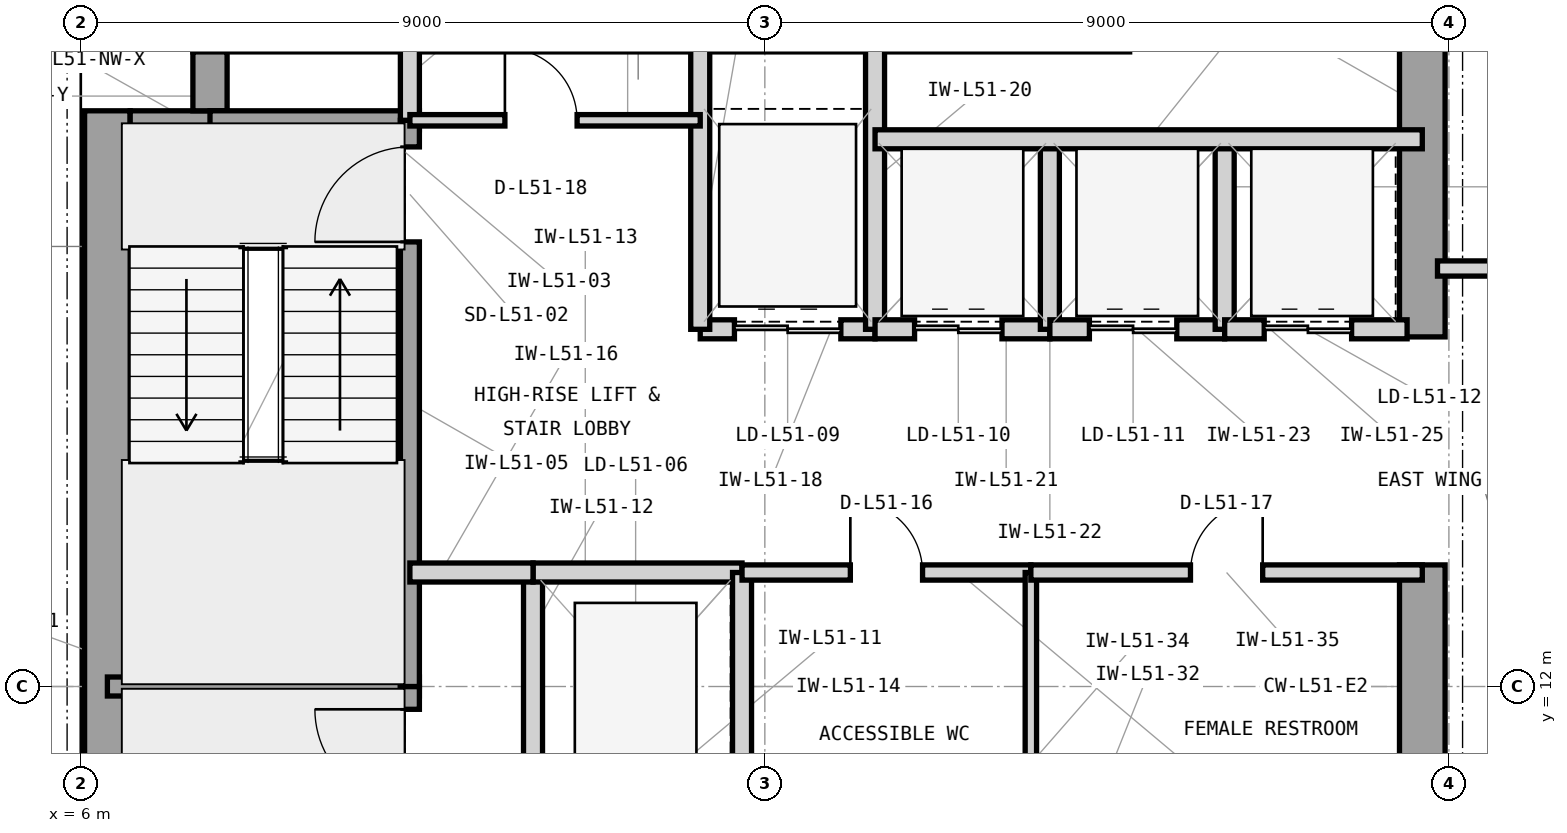
"""IFC4 building model, lengths in metres.
Left out: names, types, materials, properties, quantities, classifications, styles, units other than length and angle.
Written with IfcOpenShell. Run it as: python <this file> out.ifc"""

import sys

from ifc_helpers import new_model, si_unit, direction, frame, frame_2d, origin, place, context, subcontext, project, spatial, rectangle, extrude, element, fill, save


model = new_model("IFC4")
c1 = context("Model", 3, precision=1e-05, world=origin(), true_north=direction((0.0, 1.0)))
c2 = subcontext(c1, "Body", "Model", "MODEL_VIEW")
j1 = project(units=[si_unit("LENGTHUNIT", "METRE"), si_unit("PLANEANGLEUNIT", "RADIAN")], contexts=[c1])
p1 = place(None, origin())
s1 = spatial("IfcSite", under=j1, at=p1, CompositionType="ELEMENT")
p2 = place(p1, origin())
s2 = spatial("IfcBuilding", under=s1, at=p2, CompositionType="ELEMENT")
p3 = place(p2, frame((0.0, 0.0, 211.2)))
s3 = spatial("IfcBuildingStorey", under=s2, at=p3, CompositionType="ELEMENT", Elevation=211.2)
p4 = place(p3, frame((6.35, 4.425, 0.0), z_axis=(0.0, 0.0, 1.0), x_axis=(0.0, 1.0, 0.0)))
e1 = element("IfcWall", 1, at=p4, inside=s3, PredefinedType="SHEAR", context=c2, shape_type="SweptSolid", body=[
    extrude(rectangle(XDim=15.15, YDim=0.6, at=frame_2d((7.575, 0.0))), origin(), (0.0, 0.0, 1.0), 3.9),
])
p5 = place(p3, frame((7.475, 20.65, 0.0), z_axis=(0.0, 0.0, 1.0), x_axis=(1.0, 0.0, 0.0)))
e2 = element("IfcWall", 2, at=p5, inside=s3, PredefinedType="SHEAR", context=c2, shape_type="SweptSolid", body=[
    extrude(rectangle(XDim=12.325, YDim=0.6, at=frame_2d((6.163, 0.0))), origin(), (0.0, 0.0, 1.0), 3.9),
])
p6 = place(p3, frame((23.65, 10.4, 0.0), z_axis=(0.0, 0.0, 1.0), x_axis=(0.0, 1.0, 0.0)))
e3 = element("IfcWall", 3, at=p6, inside=s3, PredefinedType="SHEAR", context=c2, shape_type="SweptSolid", body=[
    extrude(rectangle(XDim=3.2, YDim=0.6, at=frame_2d((1.6, 0.0))), origin(), (0.0, 0.0, 1.0), 3.9),
])
p7 = place(p3, frame((23.65, 16.6, 0.0), z_axis=(0.0, 0.0, 1.0), x_axis=(0.0, 1.0, 0.0)))
e4 = element("IfcWall", 4, at=p7, inside=s3, PredefinedType="SHEAR", context=c2, shape_type="SweptSolid", body=[
    extrude(rectangle(XDim=4.05, YDim=0.6, at=frame_2d((2.025, 0.0))), origin(), (0.0, 0.0, 1.0), 3.9),
])
p8 = place(p3, frame((6.65, 19.35, 0.0), z_axis=(0.0, 0.0, 1.0), x_axis=(1.0, 0.0, 0.0)))
e5 = element("IfcWall", 5, at=p8, inside=s3, PredefinedType="SHEAR", context=c2, shape_type="SweptSolid", body=[
    extrude(rectangle(XDim=1.275, YDim=0.45, at=frame_2d((0.638, 0.0))), origin(), (0.0, 0.0, 1.0), 3.9),
])
p9 = place(p3, frame((7.7, 19.575, 0.0), z_axis=(0.0, 0.0, 1.0), x_axis=(0.0, 1.0, 0.0)))
e6 = element("IfcWall", 6, at=p9, inside=s3, PredefinedType="SHEAR", context=c2, shape_type="SweptSolid", body=[
    extrude(rectangle(XDim=0.775, YDim=0.45, at=frame_2d((0.388, 0.0))), origin(), (0.0, 0.0, 1.0), 3.9),
])
p10 = place(p3, frame((6.35, 12.0, 0.0), z_axis=(0.0, 0.0, 1.0), x_axis=(1.0, 0.0, 0.0)))
e7 = element("IfcWall", 7, at=p10, inside=s3, PredefinedType="SHEAR", context=c2, shape_type="SweptSolid", body=[
    extrude(rectangle(XDim=4.105, YDim=0.25, at=frame_2d((2.052, 0.0))), origin(), (0.0, 0.0, 1.0), 3.9),
])
p11 = place(p3, frame((7.7, 19.45, 0.0), z_axis=(0.0, 0.0, 1.0), x_axis=(1.0, 0.0, 0.0)))
e8 = element("IfcWall", 8, at=p11, inside=s3, PredefinedType="SHEAR", context=c2, shape_type="SweptSolid", body=[
    extrude(rectangle(XDim=2.755, YDim=0.25, at=frame_2d((1.377, 0.0))), origin(), (0.0, 0.0, 1.0), 3.9),
])
p12 = place(p3, frame((10.33, 4.55, 0.0), z_axis=(0.0, 0.0, 1.0), x_axis=(0.0, 1.0, 0.0)))
e9 = element("IfcWall", 9, at=p12, inside=s3, PredefinedType="SHEAR", context=c2, shape_type="SweptSolid", body=[
    extrude(rectangle(XDim=7.45, YDim=0.25, at=frame_2d((3.725, 0.0))), origin(), (0.0, 0.0, 1.0), 3.9),
])
p13 = place(p12, frame((5.9, 0.0, 0.0)))
e10 = element("IfcOpeningElement", 10, at=p13, cuts=e9, PredefinedType="OPENING", context=c2, shape_type="SweptSolid", body=[
    extrude(rectangle(XDim=1.25, YDim=2.2, at=frame_2d((0.625, 1.1))), frame((0.0, 0.135, 0.0), z_axis=(0.0, -1.0, 0.0), x_axis=(1.0, 0.0, 0.0)), (0.0, 0.0, 1.0), 0.27),
])
p14 = place(p3, frame((10.33, 12.0, 0.0), z_axis=(0.0, 0.0, 1.0), x_axis=(0.0, 1.0, 0.0)))
e11 = element("IfcWall", 11, at=p14, inside=s3, PredefinedType="SHEAR", context=c2, shape_type="SweptSolid", body=[
    extrude(rectangle(XDim=7.45, YDim=0.25, at=frame_2d((3.725, 0.0))), origin(), (0.0, 0.0, 1.0), 3.9),
])
p15 = place(p14, frame((5.85, 0.0, 0.0)))
e12 = element("IfcOpeningElement", 12, at=p15, cuts=e11, PredefinedType="OPENING", context=c2, shape_type="SweptSolid", body=[
    extrude(rectangle(XDim=1.25, YDim=2.2, at=frame_2d((0.625, 1.1))), frame((0.0, 0.135, 0.0), z_axis=(0.0, -1.0, 0.0), x_axis=(1.0, 0.0, 0.0)), (0.0, 0.0, 1.0), 0.27),
])
p16 = place(p3, frame((10.33, 19.45, 0.0), z_axis=(0.0, 0.0, 1.0), x_axis=(0.0, 1.0, 0.0)))
e13 = element("IfcWall", 13, at=p16, inside=s3, PredefinedType="PARTITIONING", context=c2, shape_type="SweptSolid", body=[
    extrude(rectangle(XDim=1.2, YDim=0.25, at=frame_2d((0.6, 0.0))), origin(), (0.0, 0.0, 1.0), 3.69),
])
p17 = place(p3, frame((11.95, 10.5, 0.0), z_axis=(0.0, 0.0, 1.0), x_axis=(0.0, 1.0, 0.0)))
e14 = element("IfcWall", 14, at=p17, inside=s3, PredefinedType="PARTITIONING", context=c2, shape_type="SweptSolid", body=[
    extrude(rectangle(XDim=3.0, YDim=0.25, at=frame_2d((1.5, 0.0))), origin(), (0.0, 0.0, 1.0), 3.69),
])
p18 = place(p3, frame((11.95, 13.5, 0.0), z_axis=(0.0, 0.0, 1.0), x_axis=(1.0, 0.0, 0.0)))
e15 = element("IfcWall", 15, at=p18, inside=s3, PredefinedType="PARTITIONING", context=c2, shape_type="SweptSolid", body=[
    extrude(rectangle(XDim=2.75, YDim=0.25, at=frame_2d((1.375, 0.0))), origin(), (0.0, 0.0, 1.0), 3.283),
])
p19 = place(p3, frame((14.7, 10.5, 0.0), z_axis=(0.0, 0.0, 1.0), x_axis=(0.0, 1.0, 0.0)))
e16 = element("IfcWall", 16, at=p19, inside=s3, PredefinedType="PARTITIONING", context=c2, shape_type="SweptSolid", body=[
    extrude(rectangle(XDim=3.0, YDim=0.25, at=frame_2d((1.5, 0.0))), origin(), (0.0, 0.0, 1.0), 3.69),
])
p20 = place(p3, frame((10.33, 13.5, 0.0), z_axis=(0.0, 0.0, 1.0), x_axis=(1.0, 0.0, 0.0)))
e17 = element("IfcWall", 17, at=p20, inside=s3, PredefinedType="PARTITIONING", context=c2, shape_type="SweptSolid", body=[
    extrude(rectangle(XDim=1.62, YDim=0.25, at=frame_2d((0.81, 0.0))), origin(), (0.0, 0.0, 1.0), 3.283),
])
p21 = place(p3, frame((14.15, 16.7, 0.0), z_axis=(0.0, 0.0, 1.0), x_axis=(1.0, 0.0, 0.0)))
e18 = element("IfcWall", 18, at=p21, inside=s3, PredefinedType="PARTITIONING", context=c2, shape_type="SweptSolid", body=[
    extrude(rectangle(XDim=2.3, YDim=0.25, at=frame_2d((1.15, 0.0))), origin(), (0.0, 0.0, 1.0), 3.283),
])
p22 = place(p21, frame((0.45, 0.0, 0.0)))
e19 = element("IfcOpeningElement", 19, at=p22, cuts=e18, PredefinedType="OPENING", context=c2, shape_type="SweptSolid", body=[
    extrude(rectangle(XDim=1.4, YDim=2.35, at=frame_2d((0.7, 1.175))), frame((0.0, 0.135, 0.0), z_axis=(0.0, -1.0, 0.0), x_axis=(1.0, 0.0, 0.0)), (0.0, 0.0, 1.0), 0.27),
])
for number, where, z_axis, x_axis in (
    (20, (14.15, 16.7, 0.0), (0.0, 0.0, 1.0), (0.0, 1.0, 0.0)),
    (21, (16.45, 16.7, 0.0), (0.0, 0.0, 1.0), (0.0, 1.0, 0.0)),
):
    element("IfcWall", number, at=place(p3, frame(where, z_axis=z_axis, x_axis=x_axis)), inside=s3, PredefinedType="PARTITIONING", context=c2, shape_type="SweptSolid", body=[
        extrude(rectangle(XDim=3.95, YDim=0.25, at=frame_2d((1.975, 0.0))), origin(), (0.0, 0.0, 1.0), 3.69),
    ])
p23 = place(p3, frame((16.45, 16.7, 0.0), z_axis=(0.0, 0.0, 1.0), x_axis=(1.0, 0.0, 0.0)))
e22 = element("IfcWall", 22, at=p23, inside=s3, PredefinedType="PARTITIONING", context=c2, shape_type="SweptSolid", body=[
    extrude(rectangle(XDim=2.3, YDim=0.25, at=frame_2d((1.15, 0.0))), origin(), (0.0, 0.0, 1.0), 3.283),
])
p24 = place(p23, frame((0.52, 0.0, 0.0)))
e23 = element("IfcOpeningElement", 23, at=p24, cuts=e22, PredefinedType="OPENING", context=c2, shape_type="SweptSolid", body=[
    extrude(rectangle(XDim=1.15, YDim=2.25, at=frame_2d((0.575, 1.125))), frame((0.0, 0.135, 0.0), z_axis=(0.0, -1.0, 0.0), x_axis=(1.0, 0.0, 0.0)), (0.0, 0.0, 1.0), 0.27),
])
p25 = place(p3, frame((18.75, 16.7, 0.0), z_axis=(0.0, 0.0, 1.0), x_axis=(0.0, 1.0, 0.0)))
e24 = element("IfcWall", 24, at=p25, inside=s3, PredefinedType="PARTITIONING", context=c2, shape_type="SweptSolid", body=[
    extrude(rectangle(XDim=2.5, YDim=0.25, at=frame_2d((1.25, 0.0))), origin(), (0.0, 0.0, 1.0), 3.69),
])
p26 = place(p3, frame((18.75, 16.7, 0.0), z_axis=(0.0, 0.0, 1.0), x_axis=(1.0, 0.0, 0.0)))
e25 = element("IfcWall", 25, at=p26, inside=s3, PredefinedType="PARTITIONING", context=c2, shape_type="SweptSolid", body=[
    extrude(rectangle(XDim=2.3, YDim=0.25, at=frame_2d((1.15, 0.0))), origin(), (0.0, 0.0, 1.0), 3.283),
])
p27 = place(p26, frame((0.52, 0.0, 0.0)))
e26 = element("IfcOpeningElement", 26, at=p27, cuts=e25, PredefinedType="OPENING", context=c2, shape_type="SweptSolid", body=[
    extrude(rectangle(XDim=1.15, YDim=2.25, at=frame_2d((0.575, 1.125))), frame((0.0, 0.135, 0.0), z_axis=(0.0, -1.0, 0.0), x_axis=(1.0, 0.0, 0.0)), (0.0, 0.0, 1.0), 0.27),
])
p28 = place(p3, frame((21.05, 16.7, 0.0), z_axis=(0.0, 0.0, 1.0), x_axis=(0.0, 1.0, 0.0)))
e27 = element("IfcWall", 27, at=p28, inside=s3, PredefinedType="PARTITIONING", context=c2, shape_type="SweptSolid", body=[
    extrude(rectangle(XDim=2.5, YDim=0.25, at=frame_2d((1.25, 0.0))), origin(), (0.0, 0.0, 1.0), 3.69),
])
p29 = place(p3, frame((21.05, 16.7, 0.0), z_axis=(0.0, 0.0, 1.0), x_axis=(1.0, 0.0, 0.0)))
e28 = element("IfcWall", 28, at=p29, inside=s3, PredefinedType="PARTITIONING", context=c2, shape_type="SweptSolid", body=[
    extrude(rectangle(XDim=2.4, YDim=0.25, at=frame_2d((1.2, 0.0))), origin(), (0.0, 0.0, 1.0), 3.283),
])
p30 = place(p29, frame((0.52, 0.0, 0.0)))
e29 = element("IfcOpeningElement", 29, at=p30, cuts=e28, PredefinedType="OPENING", context=c2, shape_type="SweptSolid", body=[
    extrude(rectangle(XDim=1.15, YDim=2.25, at=frame_2d((0.575, 1.125))), frame((0.0, 0.135, 0.0), z_axis=(0.0, -1.0, 0.0), x_axis=(1.0, 0.0, 0.0)), (0.0, 0.0, 1.0), 0.27),
])
p31 = place(p3, frame((16.45, 19.2, 0.0), z_axis=(0.0, 0.0, 1.0), x_axis=(1.0, 0.0, 0.0)))
e30 = element("IfcWall", 30, at=p31, inside=s3, PredefinedType="PARTITIONING", context=c2, shape_type="SweptSolid", body=[
    extrude(rectangle(XDim=7.2, YDim=0.25, at=frame_2d((3.6, 0.0))), origin(), (0.0, 0.0, 1.0), 3.69),
])
p32 = place(p3, frame((14.7, 13.5, 0.0), z_axis=(0.0, 0.0, 1.0), x_axis=(1.0, 0.0, 0.0)))
e31 = element("IfcWall", 31, at=p32, inside=s3, PredefinedType="PARTITIONING", context=c2, shape_type="SweptSolid", body=[
    extrude(rectangle(XDim=3.8, YDim=0.2, at=frame_2d((1.9, 0.0))), origin(), (0.0, 0.0, 1.0), 3.283),
])
p33 = place(p32, frame((1.425, 0.0, 0.0)))
e32 = element("IfcOpeningElement", 32, at=p33, cuts=e31, PredefinedType="OPENING", context=c2, shape_type="SweptSolid", body=[
    extrude(rectangle(XDim=0.95, YDim=2.1, at=frame_2d((0.475, 1.05))), frame((0.0, 0.11, 0.0), z_axis=(0.0, -1.0, 0.0), x_axis=(1.0, 0.0, 0.0)), (0.0, 0.0, 1.0), 0.22),
])
p34 = place(p3, frame((18.5, 10.15, 0.0), z_axis=(0.0, 0.0, 1.0), x_axis=(0.0, 1.0, 0.0)))
e33 = element("IfcWall", 33, at=p34, inside=s3, PredefinedType="PARTITIONING", context=c2, shape_type="SweptSolid", body=[
    extrude(rectangle(XDim=3.35, YDim=0.15, at=frame_2d((1.675, 0.0))), origin(), (0.0, 0.0, 1.0), 3.69),
])
p35 = place(p3, frame((18.5, 13.5, 0.0), z_axis=(0.0, 0.0, 1.0), x_axis=(1.0, 0.0, 0.0)))
e34 = element("IfcWall", 34, at=p35, inside=s3, PredefinedType="PARTITIONING", context=c2, shape_type="SweptSolid", body=[
    extrude(rectangle(XDim=5.15, YDim=0.2, at=frame_2d((2.575, 0.0))), origin(), (0.0, 0.0, 1.0), 3.283),
])
p36 = place(p35, frame((2.1, 0.0, 0.0)))
e35 = element("IfcOpeningElement", 35, at=p36, cuts=e34, PredefinedType="OPENING", context=c2, shape_type="SweptSolid", body=[
    extrude(rectangle(XDim=0.95, YDim=2.1, at=frame_2d((0.475, 1.05))), frame((0.0, 0.11, 0.0), z_axis=(0.0, -1.0, 0.0), x_axis=(1.0, 0.0, 0.0)), (0.0, 0.0, 1.0), 0.22),
])
p37 = place(p3, frame((10.33, 19.45, 0.0), z_axis=(0.0, 0.0, 1.0), x_axis=(1.0, 0.0, 0.0)))
e36 = element("IfcWall", 36, at=p37, inside=s3, PredefinedType="PARTITIONING", context=c2, shape_type="SweptSolid", body=[
    extrude(rectangle(XDim=3.82, YDim=0.15, at=frame_2d((1.91, 0.0))), origin(), (0.0, 0.0, 1.0), 3.69),
])
p38 = place(p37, frame((1.25, 0.0, 0.0)))
e37 = element("IfcOpeningElement", 37, at=p38, cuts=e36, PredefinedType="OPENING", context=c2, shape_type="SweptSolid", body=[
    extrude(rectangle(XDim=0.95, YDim=2.1, at=frame_2d((0.475, 1.05))), frame((0.0, 0.085, 0.0), z_axis=(0.0, -1.0, 0.0), x_axis=(1.0, 0.0, 0.0)), (0.0, 0.0, 1.0), 0.17),
])
p39 = place(p3, frame((23.85, 17.5, 0.0), z_axis=(0.0, 0.0, 1.0), x_axis=(1.0, 0.0, 0.0)))
e38 = element("IfcWall", 38, at=p39, inside=s3, PredefinedType="PARTITIONING", context=c2, shape_type="SweptSolid", body=[
    extrude(rectangle(XDim=2.85, YDim=0.2, at=frame_2d((1.425, 0.0))), origin(), (0.0, 0.0, 1.0), 3.69),
])
p40 = place(p39, frame((0.7, 0.0, 0.0)))
e39 = element("IfcOpeningElement", 39, at=p40, cuts=e38, PredefinedType="OPENING", context=c2, shape_type="SweptSolid", body=[
    extrude(rectangle(XDim=1.0, YDim=2.15, at=frame_2d((0.5, 1.075))), frame((0.0, 0.11, 0.0), z_axis=(0.0, -1.0, 0.0), x_axis=(1.0, 0.0, 0.0)), (0.0, 0.0, 1.0), 0.22),
])
p41 = place(p13, origin())
e40 = element("IfcDoor", 40, at=p41, inside=s3, OperationType="SINGLE_SWING_RIGHT", PredefinedType="DOOR", context=c2, shape_type="SweptSolid", body=[
    extrude(rectangle(XDim=1.25, YDim=2.2, at=frame_2d((0.625, 1.1))), frame((0.0, 0.025, 0.0), z_axis=(0.0, -1.0, 0.0), x_axis=(1.0, 0.0, 0.0)), (0.0, 0.0, 1.0), 0.05),
])
fill(e10, e40)
p42 = place(p15, origin())
e41 = element("IfcDoor", 41, at=p42, inside=s3, OperationType="SINGLE_SWING_LEFT", PredefinedType="DOOR", context=c2, shape_type="SweptSolid", body=[
    extrude(rectangle(XDim=1.25, YDim=2.2, at=frame_2d((0.625, 1.1))), frame((0.0, 0.025, 0.0), z_axis=(0.0, -1.0, 0.0), x_axis=(1.0, 0.0, 0.0)), (0.0, 0.0, 1.0), 0.05),
])
fill(e12, e41)
p43 = place(p22, origin())
e42 = element("IfcDoor", 42, at=p43, inside=s3, OperationType="DOUBLE_DOOR_SLIDING", PredefinedType="DOOR", context=c2, shape_type="SweptSolid", body=[
    extrude(rectangle(XDim=1.4, YDim=2.35, at=frame_2d((0.7, 1.175))), frame((0.0, 0.025, 0.0), z_axis=(0.0, -1.0, 0.0), x_axis=(1.0, 0.0, 0.0)), (0.0, 0.0, 1.0), 0.05),
])
fill(e19, e42)
p44 = place(p24, origin())
e43 = element("IfcDoor", 43, at=p44, inside=s3, OperationType="DOUBLE_DOOR_SLIDING", PredefinedType="DOOR", context=c2, shape_type="SweptSolid", body=[
    extrude(rectangle(XDim=1.15, YDim=2.25, at=frame_2d((0.575, 1.125))), frame((0.0, 0.025, 0.0), z_axis=(0.0, -1.0, 0.0), x_axis=(1.0, 0.0, 0.0)), (0.0, 0.0, 1.0), 0.05),
])
fill(e23, e43)
p45 = place(p27, origin())
e44 = element("IfcDoor", 44, at=p45, inside=s3, OperationType="DOUBLE_DOOR_SLIDING", PredefinedType="DOOR", context=c2, shape_type="SweptSolid", body=[
    extrude(rectangle(XDim=1.15, YDim=2.25, at=frame_2d((0.575, 1.125))), frame((0.0, 0.025, 0.0), z_axis=(0.0, -1.0, 0.0), x_axis=(1.0, 0.0, 0.0)), (0.0, 0.0, 1.0), 0.05),
])
fill(e26, e44)
p46 = place(p30, origin())
e45 = element("IfcDoor", 45, at=p46, inside=s3, OperationType="DOUBLE_DOOR_SLIDING", PredefinedType="DOOR", context=c2, shape_type="SweptSolid", body=[
    extrude(rectangle(XDim=1.15, YDim=2.25, at=frame_2d((0.575, 1.125))), frame((0.0, 0.025, 0.0), z_axis=(0.0, -1.0, 0.0), x_axis=(1.0, 0.0, 0.0)), (0.0, 0.0, 1.0), 0.05),
])
fill(e29, e45)
p47 = place(p33, origin())
e46 = element("IfcDoor", 46, at=p47, inside=s3, OperationType="SINGLE_SWING_LEFT", PredefinedType="DOOR", context=c2, shape_type="SweptSolid", body=[
    extrude(rectangle(XDim=0.95, YDim=2.1, at=frame_2d((0.475, 1.05))), frame((0.0, 0.025, 0.0), z_axis=(0.0, -1.0, 0.0), x_axis=(1.0, 0.0, 0.0)), (0.0, 0.0, 1.0), 0.05),
])
fill(e32, e46)
p48 = place(p36, origin())
e47 = element("IfcDoor", 47, at=p48, inside=s3, OperationType="SINGLE_SWING_RIGHT", PredefinedType="DOOR", context=c2, shape_type="SweptSolid", body=[
    extrude(rectangle(XDim=0.95, YDim=2.1, at=frame_2d((0.475, 1.05))), frame((0.0, 0.025, 0.0), z_axis=(0.0, -1.0, 0.0), x_axis=(1.0, 0.0, 0.0)), (0.0, 0.0, 1.0), 0.05),
])
fill(e35, e47)
p49 = place(p38, origin())
e48 = element("IfcDoor", 48, at=p49, inside=s3, OperationType="SINGLE_SWING_LEFT", PredefinedType="DOOR", context=c2, shape_type="SweptSolid", body=[
    extrude(rectangle(XDim=0.95, YDim=2.1, at=frame_2d((0.475, 1.05))), frame((0.0, 0.025, 0.0), z_axis=(0.0, -1.0, 0.0), x_axis=(1.0, 0.0, 0.0)), (0.0, 0.0, 1.0), 0.05),
])
fill(e37, e48)
save(model, sys.argv[1])
